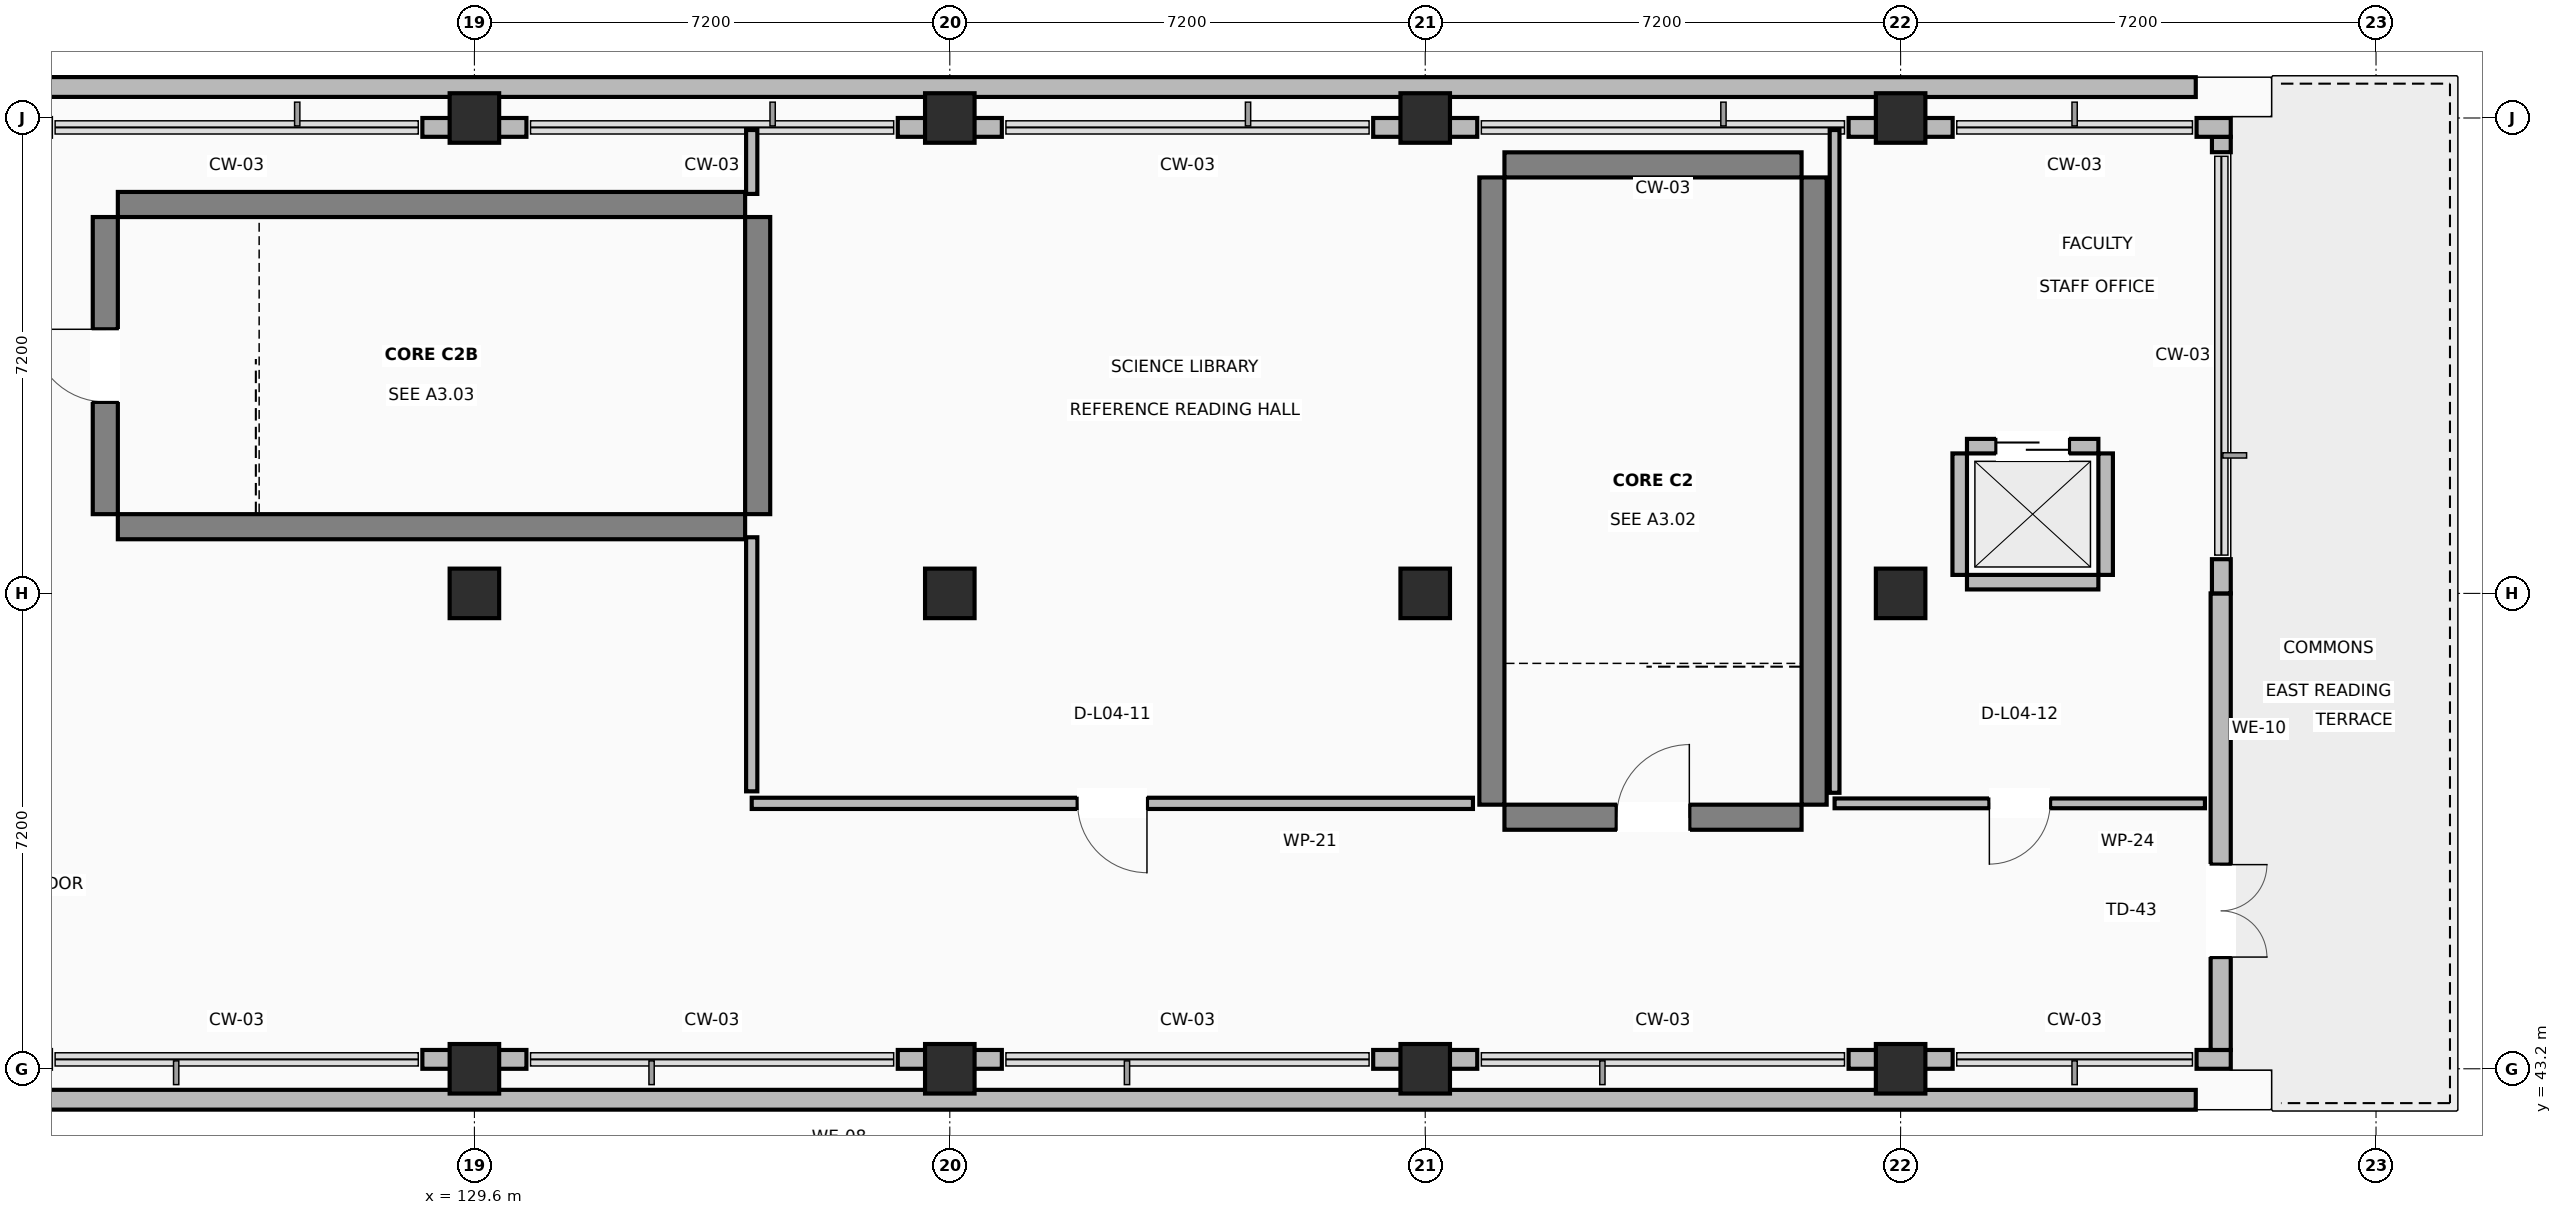
"""IFC4 building model, lengths in metres.
Left out: names, types, materials, properties, quantities, classifications, styles, units other than length and angle.
Written with IfcOpenShell. Run it as: python <this file> out.ifc"""

import sys

from ifc_helpers import new_model, si_unit, direction, frame, frame_2d, origin, origin_2d, place, context, subcontext, project, spatial, rectangle, extrude, element, fill, save


model = new_model("IFC4")
c1 = context("Model", 3, precision=1e-05, world=origin(), true_north=direction((0.0, 1.0)))
c2 = subcontext(c1, "Body", "Model", "MODEL_VIEW")
j1 = project(units=[si_unit("LENGTHUNIT", "METRE"), si_unit("PLANEANGLEUNIT", "RADIAN")], contexts=[c1])
p1 = place(None, origin())
s1 = spatial("IfcSite", under=j1, at=p1, CompositionType="ELEMENT")
p2 = place(p1, origin())
s2 = spatial("IfcBuilding", under=s1, at=p2, CompositionType="ELEMENT")
p3 = place(p2, frame((0.0, 0.0, 18.0)))
s3 = spatial("IfcBuildingStorey", under=s2, at=p3, CompositionType="ELEMENT", Elevation=18.0)
for number, where, z_axis, x_axis in (
    (1, (129.6, 43.2, 0.0), (0.0, 0.0, 1.0), (1.0, 0.0, 0.0)),
    (2, (129.6, 50.4, 0.0), (0.0, 0.0, 1.0), (1.0, 0.0, 0.0)),
    (3, (129.6, 57.6, 0.0), (0.0, 0.0, 1.0), (1.0, 0.0, 0.0)),
    (4, (136.8, 43.2, 0.0), (0.0, 0.0, 1.0), (1.0, 0.0, 0.0)),
    (5, (136.8, 50.4, 0.0), (0.0, 0.0, 1.0), (1.0, 0.0, 0.0)),
    (6, (136.8, 57.6, 0.0), (0.0, 0.0, 1.0), (1.0, 0.0, 0.0)),
    (7, (144.0, 43.2, 0.0), (0.0, 0.0, 1.0), (1.0, 0.0, 0.0)),
    (8, (144.0, 50.4, 0.0), (0.0, 0.0, 1.0), (1.0, 0.0, 0.0)),
    (9, (144.0, 57.6, 0.0), (0.0, 0.0, 1.0), (1.0, 0.0, 0.0)),
    (10, (151.2, 43.2, 0.0), (0.0, 0.0, 1.0), (1.0, 0.0, 0.0)),
    (11, (151.2, 50.4, 0.0), (0.0, 0.0, 1.0), (1.0, 0.0, 0.0)),
    (12, (151.2, 57.6, 0.0), (0.0, 0.0, 1.0), (1.0, 0.0, 0.0)),
):
    element("IfcColumn", number, at=place(p3, frame(where, z_axis=z_axis, x_axis=x_axis)), inside=s3, PredefinedType="COLUMN", context=c2, shape_type="SweptSolid", body=[
        extrude(rectangle(XDim=0.75, YDim=0.75, at=origin_2d()), origin(), (0.0, 0.0, 1.0), 4.5),
    ])
p4 = place(p3, frame((145.2, 47.01, 0.0), z_axis=(0.0, 0.0, 1.0), x_axis=(1.0, 0.0, 0.0)))
e13 = element("IfcWall", 13, at=p4, inside=s3, PredefinedType="SHEAR", context=c2, shape_type="SweptSolid", body=[
    extrude(rectangle(XDim=4.5, YDim=0.38, at=frame_2d((2.25, 0.0))), origin(), (0.0, 0.0, 1.0), 4.22),
])
p5 = place(p4, frame((1.7, 0.0, 0.0)))
e14 = element("IfcOpeningElement", 14, at=p5, cuts=e13, PredefinedType="OPENING", context=c2, shape_type="SweptSolid", body=[
    extrude(rectangle(XDim=1.1, YDim=2.15, at=frame_2d((0.55, 1.075))), frame((0.0, 0.2, 0.0), z_axis=(0.0, -1.0, 0.0), x_axis=(1.0, 0.0, 0.0)), (0.0, 0.0, 1.0), 0.4),
])
p6 = place(p3, frame((145.2, 56.89, 0.0), z_axis=(0.0, 0.0, 1.0), x_axis=(1.0, 0.0, 0.0)))
e15 = element("IfcWall", 15, at=p6, inside=s3, PredefinedType="SHEAR", context=c2, shape_type="SweptSolid", body=[
    extrude(rectangle(XDim=4.5, YDim=0.38, at=frame_2d((2.25, 0.0))), origin(), (0.0, 0.0, 1.0), 4.22),
])
for number, where, z_axis, x_axis in (
    (16, (145.01, 47.2, 0.0), (0.0, 0.0, 1.0), (0.0, 1.0, 0.0)),
    (17, (149.89, 47.2, 0.0), (0.0, 0.0, 1.0), (0.0, 1.0, 0.0)),
    (18, (124.2, 51.41, 0.0), (0.0, 0.0, 1.0), (1.0, 0.0, 0.0)),
    (19, (124.2, 56.29, 0.0), (0.0, 0.0, 1.0), (1.0, 0.0, 0.0)),
):
    element("IfcWall", number, at=place(p3, frame(where, z_axis=z_axis, x_axis=x_axis)), inside=s3, PredefinedType="SHEAR", context=c2, shape_type="SweptSolid", body=[
        extrude(rectangle(XDim=9.5, YDim=0.38, at=frame_2d((4.75, 0.0))), origin(), (0.0, 0.0, 1.0), 4.22),
    ])
p7 = place(p3, frame((124.01, 51.6, 0.0), z_axis=(0.0, 0.0, 1.0), x_axis=(0.0, 1.0, 0.0)))
e20 = element("IfcWall", 20, at=p7, inside=s3, PredefinedType="SHEAR", context=c2, shape_type="SweptSolid", body=[
    extrude(rectangle(XDim=4.5, YDim=0.38, at=frame_2d((2.25, 0.0))), origin(), (0.0, 0.0, 1.0), 4.22),
])
p8 = place(p7, frame((1.7, 0.0, 0.0)))
e21 = element("IfcOpeningElement", 21, at=p8, cuts=e20, PredefinedType="OPENING", context=c2, shape_type="SweptSolid", body=[
    extrude(rectangle(XDim=1.1, YDim=2.15, at=frame_2d((0.55, 1.075))), frame((0.0, 0.2, 0.0), z_axis=(0.0, -1.0, 0.0), x_axis=(1.0, 0.0, 0.0)), (0.0, 0.0, 1.0), 0.4),
])
p9 = place(p3, frame((133.89, 51.6, 0.0), z_axis=(0.0, 0.0, 1.0), x_axis=(0.0, 1.0, 0.0)))
e22 = element("IfcWall", 22, at=p9, inside=s3, PredefinedType="SHEAR", context=c2, shape_type="SweptSolid", body=[
    extrude(rectangle(XDim=4.5, YDim=0.38, at=frame_2d((2.25, 0.0))), origin(), (0.0, 0.0, 1.0), 4.22),
])
for number, where, z_axis, x_axis in (
    (23, (128.812, 43.343, 0.0), (0.0, 0.0, 1.0), (1.0, 0.0, 0.0)),
    (24, (136.012, 43.343, 0.0), (0.0, 0.0, 1.0), (1.0, 0.0, 0.0)),
):
    element("IfcWall", number, at=place(p3, frame(where, z_axis=z_axis, x_axis=x_axis)), inside=s3, PredefinedType="STANDARD", context=c2, shape_type="SweptSolid", body=[
        extrude(rectangle(XDim=1.576, YDim=0.285, at=frame_2d((0.788, 0.0))), origin(), (0.0, 0.0, 1.0), 3.26),
    ])
p10 = place(p3, frame((143.212, 43.343, 0.0), z_axis=(0.0, 0.0, 1.0), x_axis=(1.0, 0.0, 0.0)))
e25 = element("IfcWall", 25, at=p10, inside=s3, PredefinedType="STANDARD", context=c2, shape_type="SweptSolid", body=[
    extrude(rectangle(XDim=1.576, YDim=0.285, at=frame_2d((0.788, 0.0))), origin(), (0.0, 0.0, 1.0), 3.26),
])
p11 = place(p3, frame((150.412, 43.343, 0.0), z_axis=(0.0, 0.0, 1.0), x_axis=(1.0, 0.0, 0.0)))
e26 = element("IfcWall", 26, at=p11, inside=s3, PredefinedType="STANDARD", context=c2, shape_type="SweptSolid", body=[
    extrude(rectangle(XDim=1.576, YDim=0.285, at=frame_2d((0.788, 0.0))), origin(), (0.0, 0.0, 1.0), 3.26),
])
p12 = place(p3, frame((155.682, 43.343, 0.0), z_axis=(0.0, 0.0, 1.0), x_axis=(1.0, 0.0, 0.0)))
e27 = element("IfcWall", 27, at=p12, inside=s3, PredefinedType="STANDARD", context=c2, shape_type="SweptSolid", body=[
    extrude(rectangle(XDim=0.518, YDim=0.285, at=frame_2d((0.259, 0.0))), origin(), (0.0, 0.0, 1.0), 3.26),
])
p13 = place(p3, frame((156.048, 50.4, 0.0), z_axis=(0.0, 0.0, 1.0), x_axis=(0.0, -1.0, 0.0)))
e28 = element("IfcWall", 28, at=p13, inside=s3, PredefinedType="STANDARD", context=c2, shape_type="SweptSolid", body=[
    extrude(rectangle(XDim=6.915, YDim=0.305, at=frame_2d((3.458, 0.0))), origin(), (0.0, 0.0, 1.0), 3.26),
])
p14 = place(p13, frame((4.108, 0.0, 0.0)))
e29 = element("IfcOpeningElement", 29, at=p14, cuts=e28, PredefinedType="OPENING", context=c2, shape_type="SweptSolid", body=[
    extrude(rectangle(XDim=1.4, YDim=2.15, at=frame_2d((0.7, 1.075))), frame((0.0, 0.162, 0.0), z_axis=(0.0, -1.0, 0.0), x_axis=(1.0, 0.0, 0.0)), (0.0, 0.0, 1.0), 0.325),
])
p15 = place(p3, frame((156.058, 50.4, 0.0), z_axis=(0.0, 0.0, 1.0), x_axis=(0.0, 1.0, 0.0)))
e30 = element("IfcWall", 30, at=p15, inside=s3, PredefinedType="STANDARD", context=c2, shape_type="SweptSolid", body=[
    extrude(rectangle(XDim=0.518, YDim=0.285, at=frame_2d((0.259, 0.0))), origin(), (0.0, 0.0, 1.0), 3.26),
])
p16 = place(p3, frame((156.058, 57.082, 0.0), z_axis=(0.0, 0.0, 1.0), x_axis=(0.0, 1.0, 0.0)))
e31 = element("IfcWall", 31, at=p16, inside=s3, PredefinedType="STANDARD", context=c2, shape_type="SweptSolid", body=[
    extrude(rectangle(XDim=0.233, YDim=0.285, at=frame_2d((0.116, 0.0))), origin(), (0.0, 0.0, 1.0), 3.26),
])
p17 = place(p3, frame((156.2, 57.458, 0.0), z_axis=(0.0, 0.0, 1.0), x_axis=(-1.0, 0.0, 0.0)))
e32 = element("IfcWall", 32, at=p17, inside=s3, PredefinedType="STANDARD", context=c2, shape_type="SweptSolid", body=[
    extrude(rectangle(XDim=0.518, YDim=0.285, at=frame_2d((0.259, 0.0))), origin(), (0.0, 0.0, 1.0), 3.26),
])
p18 = place(p3, frame((151.988, 57.458, 0.0), z_axis=(0.0, 0.0, 1.0), x_axis=(-1.0, 0.0, 0.0)))
e33 = element("IfcWall", 33, at=p18, inside=s3, PredefinedType="STANDARD", context=c2, shape_type="SweptSolid", body=[
    extrude(rectangle(XDim=1.576, YDim=0.285, at=frame_2d((0.788, 0.0))), origin(), (0.0, 0.0, 1.0), 3.26),
])
p19 = place(p3, frame((144.788, 57.458, 0.0), z_axis=(0.0, 0.0, 1.0), x_axis=(-1.0, 0.0, 0.0)))
e34 = element("IfcWall", 34, at=p19, inside=s3, PredefinedType="STANDARD", context=c2, shape_type="SweptSolid", body=[
    extrude(rectangle(XDim=1.576, YDim=0.285, at=frame_2d((0.788, 0.0))), origin(), (0.0, 0.0, 1.0), 3.26),
])
for number, where, z_axis, x_axis in (
    (35, (137.588, 57.458, 0.0), (0.0, 0.0, 1.0), (-1.0, 0.0, 0.0)),
    (36, (130.388, 57.458, 0.0), (0.0, 0.0, 1.0), (-1.0, 0.0, 0.0)),
):
    element("IfcWall", number, at=place(p3, frame(where, z_axis=z_axis, x_axis=x_axis)), inside=s3, PredefinedType="STANDARD", context=c2, shape_type="SweptSolid", body=[
        extrude(rectangle(XDim=1.576, YDim=0.285, at=frame_2d((0.788, 0.0))), origin(), (0.0, 0.0, 1.0), 3.26),
    ])
p20 = place(p3, frame((155.67, 42.73, 0.0), z_axis=(0.0, 0.0, 1.0), x_axis=(-0.99999999887, 4.7533035e-05, 0.0)))
e37 = element("IfcWall", 37, at=p20, inside=s3, PredefinedType="PARAPET", context=c2, shape_type="SweptSolid", body=[
    extrude(rectangle(XDim=41.09, YDim=0.3, at=frame_2d((20.545, 0.0))), origin(), (0.0, 0.0, 1.0), 1.18),
])
p21 = place(p3, frame((114.582, 58.07, 0.0), z_axis=(0.0, 0.0, 1.0), x_axis=(0.99999999887, -4.7535295e-05, 0.0)))
e38 = element("IfcWall", 38, at=p21, inside=s3, PredefinedType="PARAPET", context=c2, shape_type="SweptSolid", body=[
    extrude(rectangle(XDim=41.088, YDim=0.3, at=frame_2d((20.544, 0.0))), origin(), (0.0, 0.0, 1.0), 1.18),
])
p22 = place(p3, frame((152.205, 50.57, 0.0), z_axis=(0.0, 0.0, 1.0), x_axis=(1.0, 0.0, 0.0)))
e39 = element("IfcWall", 39, at=p22, inside=s3, PredefinedType="STANDARD", context=c2, shape_type="SweptSolid", body=[
    extrude(rectangle(XDim=1.99, YDim=0.22, at=frame_2d((0.995, 0.0))), origin(), (0.0, 0.0, 1.0), 3.26),
])
p23 = place(p3, frame((152.205, 52.63, 0.0), z_axis=(0.0, 0.0, 1.0), x_axis=(1.0, 0.0, 0.0)))
e40 = element("IfcWall", 40, at=p23, inside=s3, PredefinedType="STANDARD", context=c2, shape_type="SweptSolid", body=[
    extrude(rectangle(XDim=1.99, YDim=0.22, at=frame_2d((0.995, 0.0))), origin(), (0.0, 0.0, 1.0), 3.26),
])
p24 = place(p23, frame((0.445, 0.0, 0.0)))
e41 = element("IfcOpeningElement", 41, at=p24, cuts=e40, PredefinedType="OPENING", context=c2, shape_type="SweptSolid", body=[
    extrude(rectangle(XDim=1.1, YDim=2.15, at=frame_2d((0.55, 1.075))), frame((0.0, 0.12, 0.0), z_axis=(0.0, -1.0, 0.0), x_axis=(1.0, 0.0, 0.0)), (0.0, 0.0, 1.0), 0.24),
])
for number, where, z_axis, x_axis in (
    (42, (152.095, 50.68, 0.0), (0.0, 0.0, 1.0), (0.0, 1.0, 0.0)),
    (43, (154.305, 50.68, 0.0), (0.0, 0.0, 1.0), (0.0, 1.0, 0.0)),
):
    element("IfcWall", number, at=place(p3, frame(where, z_axis=z_axis, x_axis=x_axis)), inside=s3, PredefinedType="STANDARD", context=c2, shape_type="SweptSolid", body=[
        extrude(rectangle(XDim=1.84, YDim=0.22, at=frame_2d((0.92, 0.0))), origin(), (0.0, 0.0, 1.0), 3.26),
    ])
p25 = place(p3, frame((144.723, 47.22, 0.0), z_axis=(0.0, 0.0, 1.0), x_axis=(-1.0, 0.0, 0.0)))
e44 = element("IfcWall", 44, at=p25, inside=s3, PredefinedType="PARTITIONING", context=c2, shape_type="SweptSolid", body=[
    extrude(rectangle(XDim=10.923, YDim=0.17, at=frame_2d((5.461, 0.0))), origin(), (0.0, 0.0, 1.0), 3.26),
])
p26 = place(p25, frame((4.937, 0.0, 0.0)))
e45 = element("IfcOpeningElement", 45, at=p26, cuts=e44, PredefinedType="OPENING", context=c2, shape_type="SweptSolid", body=[
    extrude(rectangle(XDim=1.05, YDim=2.15, at=frame_2d((0.525, 1.075))), frame((0.0, 0.095, 0.0), z_axis=(0.0, -1.0, 0.0), x_axis=(1.0, 0.0, 0.0)), (0.0, 0.0, 1.0), 0.19),
])
p27 = place(p3, frame((133.8, 47.402, 0.0), z_axis=(0.0, 0.0, 1.0), x_axis=(0.0, 1.0, 0.0)))
e46 = element("IfcWall", 46, at=p27, inside=s3, PredefinedType="PARTITIONING", context=c2, shape_type="SweptSolid", body=[
    extrude(rectangle(XDim=3.848, YDim=0.17, at=frame_2d((1.924, 0.0))), origin(), (0.0, 0.0, 1.0), 3.26),
])
p28 = place(p3, frame((133.8, 56.45, 0.0), z_axis=(0.0, 0.0, 1.0), x_axis=(0.0, 1.0, 0.0)))
e47 = element("IfcWall", 47, at=p28, inside=s3, PredefinedType="PARTITIONING", context=c2, shape_type="SweptSolid", body=[
    extrude(rectangle(XDim=0.968, YDim=0.17, at=frame_2d((0.484, 0.0))), origin(), (0.0, 0.0, 1.0), 3.26),
])
p29 = place(p3, frame((155.809, 47.22, 0.0), z_axis=(0.0, 0.0, 1.0), x_axis=(-1.0, 0.0, 0.0)))
e48 = element("IfcWall", 48, at=p29, inside=s3, PredefinedType="PARTITIONING", context=c2, shape_type="SweptSolid", body=[
    extrude(rectangle(XDim=5.609, YDim=0.148, at=frame_2d((2.805, 0.0))), origin(), (0.0, 0.0, 1.0), 3.26),
])
p30 = place(p29, frame((2.345, 0.0, 0.0)))
e49 = element("IfcOpeningElement", 49, at=p30, cuts=e48, PredefinedType="OPENING", context=c2, shape_type="SweptSolid", body=[
    extrude(rectangle(XDim=0.92, YDim=2.1, at=frame_2d((0.46, 1.05))), frame((0.0, 0.084, 0.0), z_axis=(0.0, -1.0, 0.0), x_axis=(1.0, 0.0, 0.0)), (0.0, 0.0, 1.0), 0.168),
])
p31 = place(p3, frame((150.2, 47.38, 0.0), z_axis=(0.0, 0.0, 1.0), x_axis=(0.0, 1.0, 0.0)))
e50 = element("IfcWall", 50, at=p31, inside=s3, PredefinedType="PARTITIONING", context=c2, shape_type="SweptSolid", body=[
    extrude(rectangle(XDim=10.038, YDim=0.148, at=frame_2d((5.019, 0.0))), origin(), (0.0, 0.0, 1.0), 3.26),
])
p32 = place(p14, origin())
e51 = element("IfcDoor", 51, at=p32, inside=s3, OperationType="DOUBLE_DOOR_SINGLE_SWING", PredefinedType="DOOR", context=c2, shape_type="SweptSolid", body=[
    extrude(rectangle(XDim=1.4, YDim=2.15, at=frame_2d((0.7, 1.075))), frame((0.0, 0.025, 0.0), z_axis=(0.0, -1.0, 0.0), x_axis=(1.0, 0.0, 0.0)), (0.0, 0.0, 1.0), 0.05),
])
fill(e29, e51)
p33 = place(p5, origin())
e52 = element("IfcDoor", 52, at=p33, inside=s3, OperationType="SINGLE_SWING_RIGHT", PredefinedType="DOOR", context=c2, shape_type="SweptSolid", body=[
    extrude(rectangle(XDim=1.1, YDim=2.15, at=frame_2d((0.55, 1.075))), frame((0.0, 0.025, 0.0), z_axis=(0.0, -1.0, 0.0), x_axis=(1.0, 0.0, 0.0)), (0.0, 0.0, 1.0), 0.05),
])
fill(e14, e52)
p34 = place(p8, origin())
e53 = element("IfcDoor", 53, at=p34, inside=s3, OperationType="SINGLE_SWING_RIGHT", PredefinedType="DOOR", context=c2, shape_type="SweptSolid", body=[
    extrude(rectangle(XDim=1.1, YDim=2.15, at=frame_2d((0.55, 1.075))), frame((0.0, 0.025, 0.0), z_axis=(0.0, -1.0, 0.0), x_axis=(1.0, 0.0, 0.0)), (0.0, 0.0, 1.0), 0.05),
])
fill(e21, e53)
p35 = place(p24, origin())
e54 = element("IfcDoor", 54, at=p35, inside=s3, OperationType="SLIDING_TO_RIGHT", PredefinedType="DOOR", context=c2, shape_type="SweptSolid", body=[
    extrude(rectangle(XDim=1.1, YDim=2.15, at=frame_2d((0.55, 1.075))), frame((0.0, 0.025, 0.0), z_axis=(0.0, -1.0, 0.0), x_axis=(1.0, 0.0, 0.0)), (0.0, 0.0, 1.0), 0.05),
])
fill(e41, e54)
p36 = place(p26, origin())
e55 = element("IfcDoor", 55, at=p36, inside=s3, OperationType="SINGLE_SWING_LEFT", PredefinedType="DOOR", context=c2, shape_type="SweptSolid", body=[
    extrude(rectangle(XDim=1.05, YDim=2.15, at=frame_2d((0.525, 1.075))), frame((0.0, 0.025, 0.0), z_axis=(0.0, -1.0, 0.0), x_axis=(1.0, 0.0, 0.0)), (0.0, 0.0, 1.0), 0.05),
])
fill(e45, e55)
p37 = place(p30, origin())
e56 = element("IfcDoor", 56, at=p37, inside=s3, OperationType="SINGLE_SWING_RIGHT", PredefinedType="DOOR", context=c2, shape_type="SweptSolid", body=[
    extrude(rectangle(XDim=0.92, YDim=2.1, at=frame_2d((0.46, 1.05))), frame((0.0, 0.025, 0.0), z_axis=(0.0, -1.0, 0.0), x_axis=(1.0, 0.0, 0.0)), (0.0, 0.0, 1.0), 0.05),
])
fill(e49, e56)
save(model, sys.argv[1])
